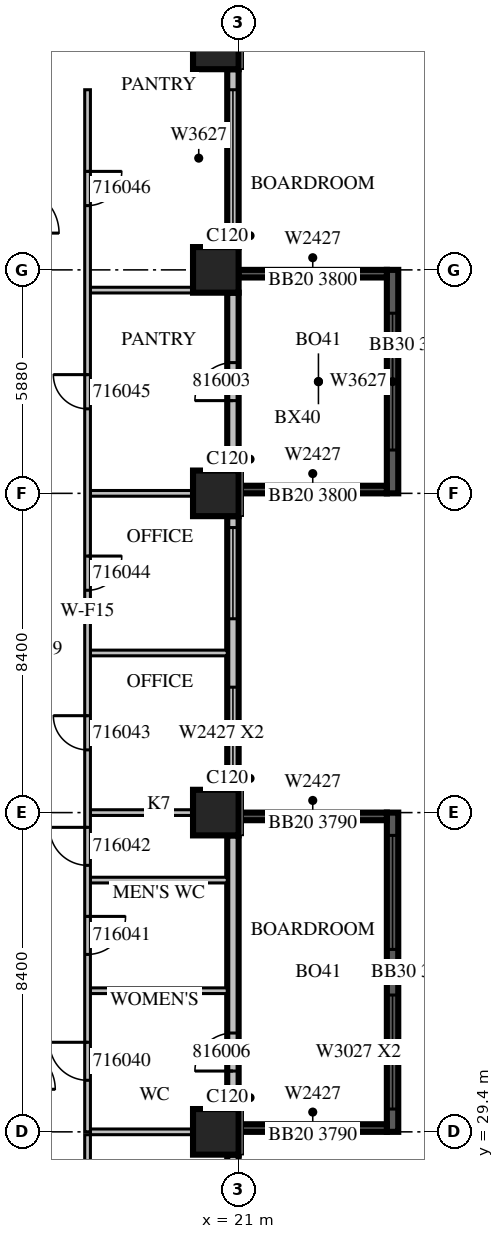
"""IFC4 building model, lengths in metres.
Left out: names, types, materials, properties, quantities, classifications, styles, units other than length and angle.
Written with IfcOpenShell. Run it as: python <this file> out.ifc"""

import sys

from ifc_helpers import new_model, si_unit, direction, frame, frame_2d, origin, origin_2d, place, context, subcontext, project, spatial, rectangle, extrude, source, transform, mapped, element, fill, save


model = new_model("IFC4")
c1 = context("Model", 3, precision=1e-05, world=origin(), true_north=direction((0.0, 1.0)))
c2 = subcontext(c1, "Body", "Model", "MODEL_VIEW")
j1 = project(units=[si_unit("LENGTHUNIT", "METRE"), si_unit("PLANEANGLEUNIT", "RADIAN")], contexts=[c1])
p1 = place(None, origin())
s1 = spatial("IfcSite", under=j1, at=p1, CompositionType="ELEMENT")
p2 = place(p1, origin())
s2 = spatial("IfcBuilding", under=s1, at=p2, CompositionType="ELEMENT")
p3 = place(p2, frame((0.0, 0.0, 78.3)))
s3 = spatial("IfcBuildingStorey", under=s2, at=p3, CompositionType="ELEMENT", Elevation=78.3)
m1 = source(origin(), c2, "Body", "SweptSolid", [
    extrude(rectangle(XDim=1.2, YDim=1.2, at=origin_2d()), origin(), (0.0, 0.0, 1.0), 4.2),
])
for number, where, z_axis, x_axis in (
    (1, (20.4, 29.4, 0.0), (0.0, 0.0, 1.0), (1.0, 0.0, 0.0)),
    (2, (20.4, 37.8, 0.0), (0.0, 0.0, 1.0), (1.0, 0.0, 0.0)),
    (3, (20.4, 46.2, 0.0), (0.0, 0.0, 1.0), (1.0, 0.0, 0.0)),
    (4, (20.4, 52.08, 0.0), (0.0, 0.0, 1.0), (1.0, 0.0, 0.0)),
    (5, (20.4, 57.96, 0.0), (0.0, 0.0, 1.0), (1.0, 0.0, 0.0)),
):
    element("IfcColumn", number, at=place(p3, frame(where, z_axis=z_axis, x_axis=x_axis)), inside=s3, PredefinedType="COLUMN", context=c2, shape_type="MappedRepresentation", body=[
        mapped(m1, transform((0.0, 0.0, 0.0), scale=1.0)),
    ])
m2 = source(origin(), c2, "Body", "SweptSolid", [
    extrude(rectangle(XDim=5.88, YDim=0.3, at=frame_2d((2.94, 0.0))), origin(), (0.0, 0.0, 1.0), 3.8),
])
p4 = place(p3, frame((25.05, 46.2, 0.0), z_axis=(0.0, 0.0, 1.0), x_axis=(0.0, 1.0, 0.0)))
e6 = element("IfcWall", 6, at=p4, inside=s3, PredefinedType="SOLIDWALL", context=c2, shape_type="MappedRepresentation", body=[
    mapped(m2, transform((0.0, 0.0, 0.0), scale=1.0)),
])
m3 = source(origin(), c2, "Body", "SweptSolid", [
    extrude(rectangle(XDim=3.6, YDim=2.7, at=frame_2d((1.8, 1.35))), frame((0.0, 0.16, 0.0), z_axis=(0.0, -1.0, 0.0), x_axis=(1.0, 0.0, 0.0)), (0.0, 0.0, 1.0), 0.32),
])
p5 = place(p4, frame((1.14, 0.0, 0.6)))
e7 = element("IfcOpeningElement", 7, at=p5, cuts=e6, PredefinedType="OPENING", context=c2, shape_type="MappedRepresentation", body=[
    mapped(m3, transform((0.0, 0.0, 0.0), scale=1.0)),
])
m4 = source(origin(), c2, "Body", "SweptSolid", [
    extrude(rectangle(XDim=3.9, YDim=0.2, at=frame_2d((1.95, 0.0))), origin(), (0.0, 0.0, 1.0), 3.8),
])
p6 = place(p3, frame((21.0, 46.3, 0.0), z_axis=(0.0, 0.0, 1.0), x_axis=(1.0, 0.0, 0.0)))
e8 = element("IfcWall", 8, at=p6, inside=s3, PredefinedType="SOLIDWALL", context=c2, shape_type="MappedRepresentation", body=[
    mapped(m4, transform((0.0, 0.0, 0.0), scale=1.0)),
])
m5 = source(origin(), c2, "Body", "SweptSolid", [
    extrude(rectangle(XDim=2.4, YDim=2.7, at=frame_2d((1.2, 1.35))), frame((0.0, 0.11, 0.0), z_axis=(0.0, -1.0, 0.0), x_axis=(1.0, 0.0, 0.0)), (0.0, 0.0, 1.0), 0.22),
])
p7 = place(p6, frame((0.75, 0.0, 0.6)))
e9 = element("IfcOpeningElement", 9, at=p7, cuts=e8, PredefinedType="OPENING", context=c2, shape_type="MappedRepresentation", body=[
    mapped(m5, transform((0.0, 0.0, 0.0), scale=1.0)),
])
p8 = place(p3, frame((21.0, 51.98, 0.0), z_axis=(0.0, 0.0, 1.0), x_axis=(1.0, 0.0, 0.0)))
e10 = element("IfcWall", 10, at=p8, inside=s3, PredefinedType="SOLIDWALL", context=c2, shape_type="MappedRepresentation", body=[
    mapped(m4, transform((0.0, 0.0, 0.0), scale=1.0)),
])
p9 = place(p8, frame((0.75, 0.0, 0.6)))
e11 = element("IfcOpeningElement", 11, at=p9, cuts=e10, PredefinedType="OPENING", context=c2, shape_type="MappedRepresentation", body=[
    mapped(m5, transform((0.0, 0.0, 0.0), scale=1.0)),
])
m6 = source(origin(), c2, "Body", "SweptSolid", [
    extrude(rectangle(XDim=6.6, YDim=0.3, at=frame_2d((3.3, 0.0))), origin(), (0.0, 0.0, 1.0), 3.8),
])
p10 = place(p3, frame((20.85, 22.2, 0.0), z_axis=(0.0, 0.0, 1.0), x_axis=(0.0, 1.0, 0.0)))
e12 = element("IfcWall", 12, at=p10, inside=s3, PredefinedType="STANDARD", context=c2, shape_type="MappedRepresentation", body=[
    mapped(m6, transform((0.0, 0.0, 0.0), scale=1.0)),
])
m7 = source(origin(), c2, "Body", "SweptSolid", [
    extrude(rectangle(XDim=1.2, YDim=2.7, at=frame_2d((0.6, 1.35))), frame((0.0, 0.16, 0.0), z_axis=(0.0, -1.0, 0.0), x_axis=(1.0, 0.0, 0.0)), (0.0, 0.0, 1.0), 0.32),
])
p11 = place(p10, frame((0.3, 0.0, 0.6)))
e13 = element("IfcOpeningElement", 13, at=p11, cuts=e12, PredefinedType="OPENING", context=c2, shape_type="MappedRepresentation", body=[
    mapped(m7, transform((0.0, 0.0, 0.0), scale=1.0)),
])
m8 = source(origin(), c2, "Body", "SweptSolid", [
    extrude(rectangle(XDim=2.4, YDim=2.7, at=frame_2d((1.2, 1.35))), frame((0.0, 0.16, 0.0), z_axis=(0.0, -1.0, 0.0), x_axis=(1.0, 0.0, 0.0)), (0.0, 0.0, 1.0), 0.32),
])
p12 = place(p10, frame((3.9, 0.0, 0.6)))
e14 = element("IfcOpeningElement", 14, at=p12, cuts=e12, PredefinedType="OPENING", context=c2, shape_type="MappedRepresentation", body=[
    mapped(m8, transform((0.0, 0.0, 0.0), scale=1.0)),
])
m9 = source(origin(), c2, "Body", "SweptSolid", [
    extrude(rectangle(XDim=7.2, YDim=0.3, at=frame_2d((3.6, 0.0))), origin(), (0.0, 0.0, 1.0), 3.8),
])
p13 = place(p3, frame((20.85, 30.0, 0.0), z_axis=(0.0, 0.0, 1.0), x_axis=(0.0, 1.0, 0.0)))
e15 = element("IfcWall", 15, at=p13, inside=s3, PredefinedType="STANDARD", context=c2, shape_type="MappedRepresentation", body=[
    mapped(m9, transform((0.0, 0.0, 0.0), scale=1.0)),
])
m10 = source(origin(), c2, "Body", "SweptSolid", [
    extrude(rectangle(XDim=1.0, YDim=2.1, at=frame_2d((0.5, 1.05))), frame((0.0, 0.16, 0.0), z_axis=(0.0, -1.0, 0.0), x_axis=(1.0, 0.0, 0.0)), (0.0, 0.0, 1.0), 0.32),
])
p14 = place(p13, frame((1.0, 0.0, 0.0)))
e16 = element("IfcOpeningElement", 16, at=p14, cuts=e15, PredefinedType="OPENING", context=c2, shape_type="MappedRepresentation", body=[
    mapped(m10, transform((0.0, 0.0, 0.0), scale=1.0)),
])
p15 = place(p3, frame((20.85, 38.4, 0.0), z_axis=(0.0, 0.0, 1.0), x_axis=(0.0, 1.0, 0.0)))
e17 = element("IfcWall", 17, at=p15, inside=s3, PredefinedType="STANDARD", context=c2, shape_type="MappedRepresentation", body=[
    mapped(m9, transform((0.0, 0.0, 0.0), scale=1.0)),
])
p16 = place(p15, frame((0.3, 0.0, 0.6)))
e18 = element("IfcOpeningElement", 18, at=p16, cuts=e17, PredefinedType="OPENING", context=c2, shape_type="MappedRepresentation", body=[
    mapped(m8, transform((0.0, 0.0, 0.0), scale=1.0)),
])
p17 = place(p15, frame((4.5, 0.0, 0.6)))
e19 = element("IfcOpeningElement", 19, at=p17, cuts=e17, PredefinedType="OPENING", context=c2, shape_type="MappedRepresentation", body=[
    mapped(m8, transform((0.0, 0.0, 0.0), scale=1.0)),
])
m11 = source(origin(), c2, "Body", "SweptSolid", [
    extrude(rectangle(XDim=4.68, YDim=0.3, at=frame_2d((2.34, 0.0))), origin(), (0.0, 0.0, 1.0), 3.8),
])
p18 = place(p3, frame((20.85, 46.8, 0.0), z_axis=(0.0, 0.0, 1.0), x_axis=(0.0, 1.0, 0.0)))
e20 = element("IfcWall", 20, at=p18, inside=s3, PredefinedType="STANDARD", context=c2, shape_type="MappedRepresentation", body=[
    mapped(m11, transform((0.0, 0.0, 0.0), scale=1.0)),
])
p19 = place(p18, frame((1.84, 0.0, 0.0)))
e21 = element("IfcOpeningElement", 21, at=p19, cuts=e20, PredefinedType="OPENING", context=c2, shape_type="MappedRepresentation", body=[
    mapped(m10, transform((0.0, 0.0, 0.0), scale=1.0)),
])
p20 = place(p3, frame((20.85, 52.68, 0.0), z_axis=(0.0, 0.0, 1.0), x_axis=(0.0, 1.0, 0.0)))
e22 = element("IfcWall", 22, at=p20, inside=s3, PredefinedType="STANDARD", context=c2, shape_type="MappedRepresentation", body=[
    mapped(m11, transform((0.0, 0.0, 0.0), scale=1.0)),
])
p21 = place(p20, frame((0.54, 0.0, 0.6)))
e23 = element("IfcOpeningElement", 23, at=p21, cuts=e22, PredefinedType="OPENING", context=c2, shape_type="MappedRepresentation", body=[
    mapped(m3, transform((0.0, 0.0, 0.0), scale=1.0)),
])
m12 = source(origin(), c2, "Body", "SweptSolid", [
    extrude(rectangle(XDim=8.4, YDim=0.3, at=frame_2d((4.2, 0.0))), origin(), (0.0, 0.0, 1.0), 3.79),
])
p22 = place(p3, frame((25.05, 29.4, 0.0), z_axis=(0.0, 0.0, 1.0), x_axis=(0.0, 1.0, 0.0)))
e24 = element("IfcWall", 24, at=p22, inside=s3, PredefinedType="SOLIDWALL", context=c2, shape_type="MappedRepresentation", body=[
    mapped(m12, transform((0.0, 0.0, 0.0), scale=1.0)),
])
m13 = source(origin(), c2, "Body", "SweptSolid", [
    extrude(rectangle(XDim=3.0, YDim=2.7, at=frame_2d((1.5, 1.35))), frame((0.0, 0.16, 0.0), z_axis=(0.0, -1.0, 0.0), x_axis=(1.0, 0.0, 0.0)), (0.0, 0.0, 1.0), 0.32),
])
p23 = place(p22, frame((0.6, 0.0, 0.6)))
e25 = element("IfcOpeningElement", 25, at=p23, cuts=e24, PredefinedType="OPENING", context=c2, shape_type="MappedRepresentation", body=[
    mapped(m13, transform((0.0, 0.0, 0.0), scale=1.0)),
])
p24 = place(p22, frame((4.8, 0.0, 0.6)))
e26 = element("IfcOpeningElement", 26, at=p24, cuts=e24, PredefinedType="OPENING", context=c2, shape_type="MappedRepresentation", body=[
    mapped(m13, transform((0.0, 0.0, 0.0), scale=1.0)),
])
m14 = source(origin(), c2, "Body", "SweptSolid", [
    extrude(rectangle(XDim=3.9, YDim=0.2, at=frame_2d((1.95, 0.0))), origin(), (0.0, 0.0, 1.0), 3.79),
])
p25 = place(p3, frame((21.0, 29.5, 0.0), z_axis=(0.0, 0.0, 1.0), x_axis=(1.0, 0.0, 0.0)))
e27 = element("IfcWall", 27, at=p25, inside=s3, PredefinedType="SOLIDWALL", context=c2, shape_type="MappedRepresentation", body=[
    mapped(m14, transform((0.0, 0.0, 0.0), scale=1.0)),
])
p26 = place(p25, frame((0.75, 0.0, 0.6)))
e28 = element("IfcOpeningElement", 28, at=p26, cuts=e27, PredefinedType="OPENING", context=c2, shape_type="MappedRepresentation", body=[
    mapped(m5, transform((0.0, 0.0, 0.0), scale=1.0)),
])
p27 = place(p3, frame((21.0, 37.7, 0.0), z_axis=(0.0, 0.0, 1.0), x_axis=(1.0, 0.0, 0.0)))
e29 = element("IfcWall", 29, at=p27, inside=s3, PredefinedType="SOLIDWALL", context=c2, shape_type="MappedRepresentation", body=[
    mapped(m14, transform((0.0, 0.0, 0.0), scale=1.0)),
])
p28 = place(p27, frame((0.75, 0.0, 0.6)))
e30 = element("IfcOpeningElement", 30, at=p28, cuts=e29, PredefinedType="OPENING", context=c2, shape_type="MappedRepresentation", body=[
    mapped(m5, transform((0.0, 0.0, 0.0), scale=1.0)),
])
m15 = source(origin(), c2, "Body", "SweptSolid", [
    extrude(rectangle(XDim=4.45, YDim=0.15, at=frame_2d((2.225, 0.0))), origin(), (0.0, 0.0, 1.0), 3.8),
])
p29 = place(p3, frame((17.025, 29.325, 0.0), z_axis=(0.0, 0.0, 1.0), x_axis=(0.0, -1.0, 0.0)))
e31 = element("IfcWall", 31, at=p29, inside=s3, PredefinedType="PARTITIONING", context=c2, shape_type="MappedRepresentation", body=[
    mapped(m15, transform((0.0, 0.0, 0.0), scale=1.0)),
])
m16 = source(origin(), c2, "Body", "SweptSolid", [
    extrude(rectangle(XDim=2.701, YDim=0.15, at=frame_2d((1.351, 0.0))), origin(), (0.0, 0.0, 1.0), 3.8),
])
p30 = place(p3, frame((19.801, 29.4, 0.0), z_axis=(0.0, 0.0, 1.0), x_axis=(-1.0, 0.0, 0.0)))
e32 = element("IfcWall", 32, at=p30, inside=s3, PredefinedType="PARTITIONING", context=c2, shape_type="MappedRepresentation", body=[
    mapped(m16, transform((0.0, 0.0, 0.0), scale=1.0)),
])
m17 = source(origin(), c2, "Body", "SweptSolid", [
    extrude(rectangle(XDim=3.6, YDim=0.15, at=frame_2d((1.8, 0.0))), origin(), (0.0, 0.0, 1.0), 3.8),
])
for number, where, z_axis, x_axis in (
    (33, (17.1, 33.113, 0.0), (0.0, 0.0, 1.0), (1.0, 0.0, 0.0)),
    (34, (17.1, 36.024, 0.0), (0.0, 0.0, 1.0), (1.0, 0.0, 0.0)),
    (35, (17.1, 42.0, 0.0), (0.0, 0.0, 1.0), (1.0, 0.0, 0.0)),
):
    element("IfcWall", number, at=place(p3, frame(where, z_axis=z_axis, x_axis=x_axis)), inside=s3, PredefinedType="PARTITIONING", context=c2, shape_type="MappedRepresentation", body=[
        mapped(m17, transform((0.0, 0.0, 0.0), scale=1.0)),
    ])
for number, where, z_axis, x_axis in (
    (36, (17.1, 51.547, 0.0), (0.0, 0.0, 1.0), (1.0, 0.0, 0.0)),
    (37, (19.801, 37.8, 0.0), (0.0, 0.0, 1.0), (-1.0, 0.0, 0.0)),
    (38, (19.801, 46.2, 0.0), (0.0, 0.0, 1.0), (-1.0, 0.0, 0.0)),
):
    element("IfcWall", number, at=place(p3, frame(where, z_axis=z_axis, x_axis=x_axis)), inside=s3, PredefinedType="PARTITIONING", context=c2, shape_type="MappedRepresentation", body=[
        mapped(m16, transform((0.0, 0.0, 0.0), scale=1.0)),
    ])
p31 = place(p3, frame((17.025, 56.82, 0.0), z_axis=(0.0, 0.0, 1.0), x_axis=(0.0, -1.0, 0.0)))
e39 = element("IfcWall", 39, at=p31, inside=s3, PredefinedType="PARTITIONING", context=c2, shape_type="SweptSolid", body=[
    extrude(rectangle(XDim=27.42, YDim=0.15, at=frame_2d((13.71, 0.0))), origin(), (0.0, 0.0, 1.0), 3.8),
])
m18 = source(origin(), c2, "Body", "SweptSolid", [
    extrude(rectangle(XDim=1.0, YDim=2.1, at=frame_2d((0.5, 1.05))), frame((0.0, 0.085, 0.0), z_axis=(0.0, -1.0, 0.0), x_axis=(1.0, 0.0, 0.0)), (0.0, 0.0, 1.0), 0.17),
])
p32 = place(p31, frame((25.063, 0.0, 0.0)))
e40 = element("IfcOpeningElement", 40, at=p32, cuts=e39, PredefinedType="OPENING", context=c2, shape_type="MappedRepresentation", body=[
    mapped(m18, transform((0.0, 0.0, 0.0), scale=1.0)),
])
p33 = place(p31, frame((21.751, 0.0, 0.0)))
e41 = element("IfcOpeningElement", 41, at=p33, cuts=e39, PredefinedType="OPENING", context=c2, shape_type="MappedRepresentation", body=[
    mapped(m18, transform((0.0, 0.0, 0.0), scale=1.0)),
])
p34 = place(p31, frame((19.408, 0.0, 0.0)))
e42 = element("IfcOpeningElement", 42, at=p34, cuts=e39, PredefinedType="OPENING", context=c2, shape_type="MappedRepresentation", body=[
    mapped(m18, transform((0.0, 0.0, 0.0), scale=1.0)),
])
m19 = source(origin(), c2, "Body", "SweptSolid", [
    extrude(rectangle(XDim=0.9, YDim=2.1, at=frame_2d((0.45, 1.05))), frame((0.0, 0.085, 0.0), z_axis=(0.0, -1.0, 0.0), x_axis=(1.0, 0.0, 0.0)), (0.0, 0.0, 1.0), 0.17),
])
p35 = place(p31, frame((16.47, 0.0, 0.0)))
e43 = element("IfcOpeningElement", 43, at=p35, cuts=e39, PredefinedType="OPENING", context=c2, shape_type="MappedRepresentation", body=[
    mapped(m19, transform((0.0, 0.0, 0.0), scale=1.0)),
])
p36 = place(p31, frame((12.27, 0.0, 0.0)))
e44 = element("IfcOpeningElement", 44, at=p36, cuts=e39, PredefinedType="OPENING", context=c2, shape_type="MappedRepresentation", body=[
    mapped(m19, transform((0.0, 0.0, 0.0), scale=1.0)),
])
p37 = place(p31, frame((7.496, 0.0, 0.0)))
e45 = element("IfcOpeningElement", 45, at=p37, cuts=e39, PredefinedType="OPENING", context=c2, shape_type="MappedRepresentation", body=[
    mapped(m19, transform((0.0, 0.0, 0.0), scale=1.0)),
])
p38 = place(p31, frame((2.149, 0.0, 0.0)))
e46 = element("IfcOpeningElement", 46, at=p38, cuts=e39, PredefinedType="OPENING", context=c2, shape_type="MappedRepresentation", body=[
    mapped(m19, transform((0.0, 0.0, 0.0), scale=1.0)),
])
m20 = source(origin(), c2, "Body", "SweptSolid", [
    extrude(rectangle(XDim=3.6, YDim=2.7, at=frame_2d((1.8, 1.35))), frame((0.0, 0.03, 0.0), z_axis=(0.0, -1.0, 0.0), x_axis=(1.0, 0.0, 0.0)), (0.0, 0.0, 1.0), 0.06),
])
p39 = place(p5, origin())
e47 = element("IfcWindow", 47, at=p39, inside=s3, PartitioningType="SINGLE_PANEL", PredefinedType="WINDOW", context=c2, shape_type="MappedRepresentation", body=[
    mapped(m20, transform((0.0, 0.0, 0.0), scale=1.0)),
])
fill(e7, e47)
m21 = source(origin(), c2, "Body", "SweptSolid", [
    extrude(rectangle(XDim=2.4, YDim=2.7, at=frame_2d((1.2, 1.35))), frame((0.0, 0.03, 0.0), z_axis=(0.0, -1.0, 0.0), x_axis=(1.0, 0.0, 0.0)), (0.0, 0.0, 1.0), 0.06),
])
p40 = place(p7, origin())
e48 = element("IfcWindow", 48, at=p40, inside=s3, PartitioningType="SINGLE_PANEL", PredefinedType="WINDOW", context=c2, shape_type="MappedRepresentation", body=[
    mapped(m21, transform((0.0, 0.0, 0.0), scale=1.0)),
])
fill(e9, e48)
p41 = place(p9, origin())
e49 = element("IfcWindow", 49, at=p41, inside=s3, PartitioningType="SINGLE_PANEL", PredefinedType="WINDOW", context=c2, shape_type="MappedRepresentation", body=[
    mapped(m21, transform((0.0, 0.0, 0.0), scale=1.0)),
])
fill(e11, e49)
p42 = place(p16, origin())
e50 = element("IfcWindow", 50, at=p42, inside=s3, PartitioningType="SINGLE_PANEL", PredefinedType="WINDOW", context=c2, shape_type="MappedRepresentation", body=[
    mapped(m21, transform((0.0, 0.0, 0.0), scale=1.0)),
])
fill(e18, e50)
p43 = place(p17, origin())
e51 = element("IfcWindow", 51, at=p43, inside=s3, PartitioningType="SINGLE_PANEL", PredefinedType="WINDOW", context=c2, shape_type="MappedRepresentation", body=[
    mapped(m21, transform((0.0, 0.0, 0.0), scale=1.0)),
])
fill(e19, e51)
p44 = place(p21, origin())
e52 = element("IfcWindow", 52, at=p44, inside=s3, PartitioningType="SINGLE_PANEL", PredefinedType="WINDOW", context=c2, shape_type="MappedRepresentation", body=[
    mapped(m20, transform((0.0, 0.0, 0.0), scale=1.0)),
])
fill(e23, e52)
m22 = source(origin(), c2, "Body", "SweptSolid", [
    extrude(rectangle(XDim=3.0, YDim=2.7, at=frame_2d((1.5, 1.35))), frame((0.0, 0.03, 0.0), z_axis=(0.0, -1.0, 0.0), x_axis=(1.0, 0.0, 0.0)), (0.0, 0.0, 1.0), 0.06),
])
p45 = place(p23, origin())
e53 = element("IfcWindow", 53, at=p45, inside=s3, PartitioningType="SINGLE_PANEL", PredefinedType="WINDOW", context=c2, shape_type="MappedRepresentation", body=[
    mapped(m22, transform((0.0, 0.0, 0.0), scale=1.0)),
])
fill(e25, e53)
p46 = place(p24, origin())
e54 = element("IfcWindow", 54, at=p46, inside=s3, PartitioningType="SINGLE_PANEL", PredefinedType="WINDOW", context=c2, shape_type="MappedRepresentation", body=[
    mapped(m22, transform((0.0, 0.0, 0.0), scale=1.0)),
])
fill(e26, e54)
p47 = place(p26, origin())
e55 = element("IfcWindow", 55, at=p47, inside=s3, PartitioningType="SINGLE_PANEL", PredefinedType="WINDOW", context=c2, shape_type="MappedRepresentation", body=[
    mapped(m21, transform((0.0, 0.0, 0.0), scale=1.0)),
])
fill(e28, e55)
p48 = place(p28, origin())
e56 = element("IfcWindow", 56, at=p48, inside=s3, PartitioningType="SINGLE_PANEL", PredefinedType="WINDOW", context=c2, shape_type="MappedRepresentation", body=[
    mapped(m21, transform((0.0, 0.0, 0.0), scale=1.0)),
])
fill(e30, e56)
m23 = source(origin(), c2, "Body", "SweptSolid", [
    extrude(rectangle(XDim=1.0, YDim=2.1, at=frame_2d((0.5, 1.05))), frame((0.0, 0.025, 0.0), z_axis=(0.0, -1.0, 0.0), x_axis=(1.0, 0.0, 0.0)), (0.0, 0.0, 1.0), 0.05),
])
p49 = place(p32, origin())
e57 = element("IfcDoor", 57, at=p49, inside=s3, OperationType="SINGLE_SWING_RIGHT", PredefinedType="DOOR", context=c2, shape_type="MappedRepresentation", body=[
    mapped(m23, transform((0.0, 0.0, 0.0), scale=1.0)),
])
fill(e40, e57)
p50 = place(p33, origin())
e58 = element("IfcDoor", 58, at=p50, inside=s3, OperationType="SINGLE_SWING_LEFT", PredefinedType="DOOR", context=c2, shape_type="MappedRepresentation", body=[
    mapped(m23, transform((0.0, 0.0, 0.0), scale=1.0)),
])
fill(e41, e58)
p51 = place(p34, origin())
e59 = element("IfcDoor", 59, at=p51, inside=s3, OperationType="SINGLE_SWING_RIGHT", PredefinedType="DOOR", context=c2, shape_type="MappedRepresentation", body=[
    mapped(m23, transform((0.0, 0.0, 0.0), scale=1.0)),
])
fill(e42, e59)
m24 = source(origin(), c2, "Body", "SweptSolid", [
    extrude(rectangle(XDim=0.9, YDim=2.1, at=frame_2d((0.45, 1.05))), frame((0.0, 0.025, 0.0), z_axis=(0.0, -1.0, 0.0), x_axis=(1.0, 0.0, 0.0)), (0.0, 0.0, 1.0), 0.05),
])
p52 = place(p35, origin())
e60 = element("IfcDoor", 60, at=p52, inside=s3, OperationType="SINGLE_SWING_RIGHT", PredefinedType="DOOR", context=c2, shape_type="MappedRepresentation", body=[
    mapped(m24, transform((0.0, 0.0, 0.0), scale=1.0)),
])
fill(e43, e60)
p53 = place(p36, origin())
e61 = element("IfcDoor", 61, at=p53, inside=s3, OperationType="SINGLE_SWING_LEFT", PredefinedType="DOOR", context=c2, shape_type="MappedRepresentation", body=[
    mapped(m24, transform((0.0, 0.0, 0.0), scale=1.0)),
])
fill(e44, e61)
p54 = place(p37, origin())
e62 = element("IfcDoor", 62, at=p54, inside=s3, OperationType="SINGLE_SWING_RIGHT", PredefinedType="DOOR", context=c2, shape_type="MappedRepresentation", body=[
    mapped(m24, transform((0.0, 0.0, 0.0), scale=1.0)),
])
fill(e45, e62)
p55 = place(p38, origin())
e63 = element("IfcDoor", 63, at=p55, inside=s3, OperationType="SINGLE_SWING_LEFT", PredefinedType="DOOR", context=c2, shape_type="MappedRepresentation", body=[
    mapped(m24, transform((0.0, 0.0, 0.0), scale=1.0)),
])
fill(e46, e63)
p56 = place(p19, origin())
e64 = element("IfcDoor", 64, at=p56, inside=s3, OperationType="SINGLE_SWING_LEFT", PredefinedType="DOOR", context=c2, shape_type="MappedRepresentation", body=[
    mapped(m23, transform((0.0, 0.0, 0.0), scale=1.0)),
])
fill(e21, e64)
p57 = place(p14, origin())
e65 = element("IfcDoor", 65, at=p57, inside=s3, OperationType="SINGLE_SWING_LEFT", PredefinedType="DOOR", context=c2, shape_type="MappedRepresentation", body=[
    mapped(m23, transform((0.0, 0.0, 0.0), scale=1.0)),
])
fill(e16, e65)
save(model, sys.argv[1])
